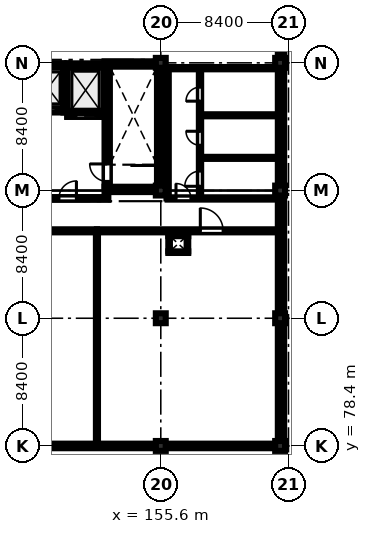
"""IFC4 building model, lengths in metres.
Left out: names, types, materials, properties, quantities, classifications, styles, units other than length and angle.
Written with IfcOpenShell. Run it as: python <this file> out.ifc"""

import sys

from ifc_helpers import new_model, si_unit, direction, frame, frame_2d, origin, origin_2d, place, context, subcontext, project, spatial, rectangle, extrude, element, fill, save


model = new_model("IFC4")
c1 = context("Model", 3, precision=1e-05, world=origin(), true_north=direction((0.0, 1.0)))
c2 = subcontext(c1, "Body", "Model", "MODEL_VIEW")
j1 = project(units=[si_unit("LENGTHUNIT", "METRE"), si_unit("PLANEANGLEUNIT", "RADIAN")], contexts=[c1])
p1 = place(None, origin())
s1 = spatial("IfcSite", under=j1, at=p1, CompositionType="ELEMENT")
p2 = place(p1, origin())
s2 = spatial("IfcBuilding", under=s1, at=p2, CompositionType="ELEMENT")
p3 = place(p2, frame((0.0, 0.0, 65.7)))
s3 = spatial("IfcBuildingStorey", under=s2, at=p3, CompositionType="ELEMENT", Elevation=65.7)
for number, where, z_axis, x_axis in (
    (1, (155.6, 78.4, 0.0), (0.0, 0.0, 1.0), (1.0, 0.0, 0.0)),
    (2, (155.6, 86.8, 0.0), (0.0, 0.0, 1.0), (1.0, 0.0, 0.0)),
    (3, (155.6, 95.2, 0.0), (0.0, 0.0, 1.0), (1.0, 0.0, 0.0)),
    (4, (155.6, 103.6, 0.0), (0.0, 0.0, 1.0), (1.0, 0.0, 0.0)),
    (5, (163.45, 78.4, 0.0), (0.0, 0.0, 1.0), (1.0, 0.0, 0.0)),
    (6, (163.45, 86.8, 0.0), (0.0, 0.0, 1.0), (1.0, 0.0, 0.0)),
    (7, (163.45, 95.2, 0.0), (0.0, 0.0, 1.0), (1.0, 0.0, 0.0)),
    (8, (163.45, 103.6, 0.0), (0.0, 0.0, 1.0), (1.0, 0.0, 0.0)),
):
    element("IfcColumn", number, at=place(p3, frame(where, z_axis=z_axis, x_axis=x_axis)), inside=s3, PredefinedType="COLUMN", context=c2, shape_type="SweptSolid", body=[
        extrude(rectangle(XDim=0.65, YDim=0.65, at=origin_2d()), origin(), (0.0, 0.0, 1.0), 4.3),
    ])
for number, where, z_axis, x_axis in (
    (9, (151.9, 95.275, 0.0), (0.0, 0.0, 1.0), (1.0, 0.0, 0.0)),
    (10, (151.9, 103.525, 0.0), (0.0, 0.0, 1.0), (1.0, 0.0, 0.0)),
):
    element("IfcWall", number, at=place(p3, frame(where, z_axis=z_axis, x_axis=x_axis)), inside=s3, PredefinedType="SHEAR", context=c2, shape_type="SweptSolid", body=[
        extrude(rectangle(XDim=3.8, YDim=0.35, at=frame_2d((1.9, 0.0))), origin(), (0.0, 0.0, 1.0), 4.3),
    ])
p4 = place(p3, frame((152.075, 95.45, 0.0), z_axis=(0.0, 0.0, 1.0), x_axis=(0.0, 1.0, 0.0)))
e11 = element("IfcWall", 11, at=p4, inside=s3, PredefinedType="SHEAR", context=c2, shape_type="SweptSolid", body=[
    extrude(rectangle(XDim=7.9, YDim=0.35, at=frame_2d((3.95, 0.0))), origin(), (0.0, 0.0, 1.0), 4.3),
])
p5 = place(p4, frame((0.35, 0.0, 0.0)))
e12 = element("IfcOpeningElement", 12, at=p5, cuts=e11, PredefinedType="OPENING", context=c2, shape_type="SweptSolid", body=[
    extrude(rectangle(XDim=1.15, YDim=2.15, at=frame_2d((0.575, 1.075))), frame((0.0, 0.185, 0.0), z_axis=(0.0, -1.0, 0.0), x_axis=(1.0, 0.0, 0.0)), (0.0, 0.0, 1.0), 0.37),
])
p6 = place(p3, frame((155.525, 95.45, 0.0), z_axis=(0.0, 0.0, 1.0), x_axis=(0.0, 1.0, 0.0)))
e13 = element("IfcWall", 13, at=p6, inside=s3, PredefinedType="SHEAR", context=c2, shape_type="SweptSolid", body=[
    extrude(rectangle(XDim=7.9, YDim=0.35, at=frame_2d((3.95, 0.0))), origin(), (0.0, 0.0, 1.0), 4.3),
])
p7 = place(p3, frame((147.15, 100.475, 0.0), z_axis=(0.0, 0.0, 1.0), x_axis=(1.0, 0.0, 0.0)))
e14 = element("IfcWall", 14, at=p7, inside=s3, PredefinedType="SHEAR", context=c2, shape_type="SweptSolid", body=[
    extrude(rectangle(XDim=2.05, YDim=0.25, at=frame_2d((1.025, 0.0))), origin(), (0.0, 0.0, 1.0), 4.3),
])
p8 = place(p7, frame((0.495, 0.0, 0.0)))
e15 = element("IfcOpeningElement", 15, at=p8, cuts=e14, PredefinedType="OPENING", context=c2, shape_type="SweptSolid", body=[
    extrude(rectangle(XDim=1.06, YDim=2.15, at=frame_2d((0.53, 1.075))), frame((0.0, 0.135, 0.0), z_axis=(0.0, -1.0, 0.0), x_axis=(1.0, 0.0, 0.0)), (0.0, 0.0, 1.0), 0.27),
])
p9 = place(p3, frame((147.15, 103.425, 0.0), z_axis=(0.0, 0.0, 1.0), x_axis=(1.0, 0.0, 0.0)))
e16 = element("IfcWall", 16, at=p9, inside=s3, PredefinedType="SHEAR", context=c2, shape_type="SweptSolid", body=[
    extrude(rectangle(XDim=2.05, YDim=0.25, at=frame_2d((1.025, 0.0))), origin(), (0.0, 0.0, 1.0), 4.3),
])
p10 = place(p3, frame((149.325, 100.35, 0.0), z_axis=(0.0, 0.0, 1.0), x_axis=(0.0, 1.0, 0.0)))
e17 = element("IfcWall", 17, at=p10, inside=s3, PredefinedType="SHEAR", context=c2, shape_type="SweptSolid", body=[
    extrude(rectangle(XDim=3.2, YDim=0.25, at=frame_2d((1.6, 0.0))), origin(), (0.0, 0.0, 1.0), 4.3),
])
for number, where, z_axis, x_axis in (
    (18, (147.15, 100.475, 4.5), (0.0, 0.0, 1.0), (1.0, 0.0, 0.0)),
    (19, (147.15, 103.425, 4.5), (0.0, 0.0, 1.0), (1.0, 0.0, 0.0)),
):
    element("IfcWall", number, at=place(p3, frame(where, z_axis=z_axis, x_axis=x_axis)), inside=s3, PredefinedType="SHEAR", context=c2, shape_type="SweptSolid", body=[
        extrude(rectangle(XDim=2.05, YDim=0.25, at=frame_2d((1.025, 0.0))), origin(), (0.0, 0.0, 1.0), 1.55),
    ])
p11 = place(p3, frame((149.325, 100.35, 4.5), z_axis=(0.0, 0.0, 1.0), x_axis=(0.0, 1.0, 0.0)))
e20 = element("IfcWall", 20, at=p11, inside=s3, PredefinedType="SHEAR", context=c2, shape_type="SweptSolid", body=[
    extrude(rectangle(XDim=3.2, YDim=0.25, at=frame_2d((1.6, 0.0))), origin(), (0.0, 0.0, 1.0), 1.55),
])
p12 = place(p3, frame((149.45, 100.175, 0.0), z_axis=(0.0, 0.0, 1.0), x_axis=(1.0, 0.0, 0.0)))
e21 = element("IfcWall", 21, at=p12, inside=s3, PredefinedType="SHEAR", context=c2, shape_type="SweptSolid", body=[
    extrude(rectangle(XDim=2.45, YDim=0.25, at=frame_2d((1.225, 0.0))), origin(), (0.0, 0.0, 1.0), 4.3),
])
p13 = place(p12, frame((0.575, 0.0, 0.0)))
e22 = element("IfcOpeningElement", 22, at=p13, cuts=e21, PredefinedType="OPENING", context=c2, shape_type="SweptSolid", body=[
    extrude(rectangle(XDim=1.3, YDim=2.25, at=frame_2d((0.65, 1.125))), frame((0.0, 0.135, 0.0), z_axis=(0.0, -1.0, 0.0), x_axis=(1.0, 0.0, 0.0)), (0.0, 0.0, 1.0), 0.27),
])
p14 = place(p3, frame((149.45, 103.425, 0.0), z_axis=(0.0, 0.0, 1.0), x_axis=(1.0, 0.0, 0.0)))
e23 = element("IfcWall", 23, at=p14, inside=s3, PredefinedType="SHEAR", context=c2, shape_type="SweptSolid", body=[
    extrude(rectangle(XDim=2.45, YDim=0.25, at=frame_2d((1.225, 0.0))), origin(), (0.0, 0.0, 1.0), 4.3),
])
for number, where, z_axis, x_axis in (
    (24, (149.45, 100.175, 4.5), (0.0, 0.0, 1.0), (1.0, 0.0, 0.0)),
    (25, (149.45, 103.425, 4.5), (0.0, 0.0, 1.0), (1.0, 0.0, 0.0)),
):
    element("IfcWall", number, at=place(p3, frame(where, z_axis=z_axis, x_axis=x_axis)), inside=s3, PredefinedType="SHEAR", context=c2, shape_type="SweptSolid", body=[
        extrude(rectangle(XDim=2.4, YDim=0.25, at=frame_2d((1.2, 0.0))), origin(), (0.0, 0.0, 1.0), 1.55),
    ])
p15 = place(p3, frame((151.975, 100.05, 4.5), z_axis=(0.0, 0.0, 1.0), x_axis=(0.0, 1.0, 0.0)))
e26 = element("IfcWall", 26, at=p15, inside=s3, PredefinedType="SHEAR", context=c2, shape_type="SweptSolid", body=[
    extrude(rectangle(XDim=3.5, YDim=0.25, at=frame_2d((1.75, 0.0))), origin(), (0.0, 0.0, 1.0), 1.55),
])
p16 = place(p3, frame((155.275, 78.4, 0.0), z_axis=(0.0, 0.0, 1.0), x_axis=(-1.0, 0.0, 0.0)))
e27 = element("IfcWall", 27, at=p16, inside=s3, PredefinedType="STANDARD", context=c2, shape_type="SweptSolid", body=[
    extrude(rectangle(XDim=7.75, YDim=0.3, at=frame_2d((3.875, 0.0))), origin(), (0.0, 0.0, 1.0), 3.7),
])
p17 = place(p16, frame((1.15, 0.0, 0.95)))
e28 = element("IfcOpeningElement", 28, at=p17, cuts=e27, PredefinedType="OPENING", context=c2, shape_type="SweptSolid", body=[
    extrude(rectangle(XDim=2.5, YDim=1.9, at=frame_2d((1.25, 0.95))), frame((0.0, 0.16, 0.0), z_axis=(0.0, -1.0, 0.0), x_axis=(1.0, 0.0, 0.0)), (0.0, 0.0, 1.0), 0.32),
])
p18 = place(p3, frame((163.125, 78.4, 0.0), z_axis=(0.0, 0.0, 1.0), x_axis=(-1.0, 0.0, 0.0)))
e29 = element("IfcWall", 29, at=p18, inside=s3, PredefinedType="STANDARD", context=c2, shape_type="SweptSolid", body=[
    extrude(rectangle(XDim=7.2, YDim=0.3, at=frame_2d((3.6, 0.0))), origin(), (0.0, 0.0, 1.0), 3.7),
])
p19 = place(p18, frame((1.15, 0.0, 0.95)))
e30 = element("IfcOpeningElement", 30, at=p19, cuts=e29, PredefinedType="OPENING", context=c2, shape_type="SweptSolid", body=[
    extrude(rectangle(XDim=2.5, YDim=1.9, at=frame_2d((1.25, 0.95))), frame((0.0, 0.16, 0.0), z_axis=(0.0, -1.0, 0.0), x_axis=(1.0, 0.0, 0.0)), (0.0, 0.0, 1.0), 0.32),
])
p20 = place(p3, frame((163.45, 86.475, 0.0), z_axis=(0.0, 0.0, 1.0), x_axis=(0.0, -1.0, 0.0)))
e31 = element("IfcWall", 31, at=p20, inside=s3, PredefinedType="STANDARD", context=c2, shape_type="SweptSolid", body=[
    extrude(rectangle(XDim=7.75, YDim=0.3, at=frame_2d((3.875, 0.0))), origin(), (0.0, 0.0, 1.0), 3.7),
])
p21 = place(p20, frame((1.15, 0.0, 1.1)))
e32 = element("IfcOpeningElement", 32, at=p21, cuts=e31, PredefinedType="OPENING", context=c2, shape_type="SweptSolid", body=[
    extrude(rectangle(XDim=1.8, YDim=1.8, at=frame_2d((0.9, 0.9))), frame((0.0, 0.16, 0.0), z_axis=(0.0, -1.0, 0.0), x_axis=(1.0, 0.0, 0.0)), (0.0, 0.0, 1.0), 0.32),
])
p22 = place(p3, frame((163.45, 94.875, 0.0), z_axis=(0.0, 0.0, 1.0), x_axis=(0.0, -1.0, 0.0)))
e33 = element("IfcWall", 33, at=p22, inside=s3, PredefinedType="STANDARD", context=c2, shape_type="SweptSolid", body=[
    extrude(rectangle(XDim=7.75, YDim=0.3, at=frame_2d((3.875, 0.0))), origin(), (0.0, 0.0, 1.0), 3.7),
])
p23 = place(p22, frame((4.2, 0.0, 1.1)))
e34 = element("IfcOpeningElement", 34, at=p23, cuts=e33, PredefinedType="OPENING", context=c2, shape_type="SweptSolid", body=[
    extrude(rectangle(XDim=1.8, YDim=1.8, at=frame_2d((0.9, 0.9))), frame((0.0, 0.16, 0.0), z_axis=(0.0, -1.0, 0.0), x_axis=(1.0, 0.0, 0.0)), (0.0, 0.0, 1.0), 0.32),
])
p24 = place(p3, frame((163.45, 103.275, 0.0), z_axis=(0.0, 0.0, 1.0), x_axis=(0.0, -1.0, 0.0)))
e35 = element("IfcWall", 35, at=p24, inside=s3, PredefinedType="STANDARD", context=c2, shape_type="SweptSolid", body=[
    extrude(rectangle(XDim=7.75, YDim=0.3, at=frame_2d((3.875, 0.0))), origin(), (0.0, 0.0, 1.0), 3.7),
])
p25 = place(p24, frame((1.15, 0.0, 1.1)))
e36 = element("IfcOpeningElement", 36, at=p25, cuts=e35, PredefinedType="OPENING", context=c2, shape_type="SweptSolid", body=[
    extrude(rectangle(XDim=1.4, YDim=1.4, at=frame_2d((0.7, 0.7))), frame((0.0, 0.16, 0.0), z_axis=(0.0, -1.0, 0.0), x_axis=(1.0, 0.0, 0.0)), (0.0, 0.0, 1.0), 0.32),
])
p26 = place(p3, frame((163.45, 111.125, 0.0), z_axis=(0.0, 0.0, 1.0), x_axis=(0.0, -1.0, 0.0)))
e37 = element("IfcWall", 37, at=p26, inside=s3, PredefinedType="STANDARD", context=c2, shape_type="SweptSolid", body=[
    extrude(rectangle(XDim=7.2, YDim=0.3, at=frame_2d((3.6, 0.0))), origin(), (0.0, 0.0, 1.0), 3.7),
])
p27 = place(p26, frame((1.15, 0.0, 1.1)))
e38 = element("IfcOpeningElement", 38, at=p27, cuts=e37, PredefinedType="OPENING", context=c2, shape_type="SweptSolid", body=[
    extrude(rectangle(XDim=1.8, YDim=1.8, at=frame_2d((0.9, 0.9))), frame((0.0, 0.16, 0.0), z_axis=(0.0, -1.0, 0.0), x_axis=(1.0, 0.0, 0.0)), (0.0, 0.0, 1.0), 0.32),
])
p28 = place(p3, frame((138.685, 78.4, 4.5), z_axis=(0.0, 0.0, 1.0), x_axis=(1.0, 0.0, 0.0)))
e39 = element("IfcWall", 39, at=p28, inside=s3, PredefinedType="PARAPET", context=c2, shape_type="SweptSolid", body=[
    extrude(rectangle(XDim=25.03, YDim=0.23, at=frame_2d((12.515, 0.0))), origin(), (0.0, 0.0, 1.0), 1.35),
])
p29 = place(p3, frame((163.6, 78.515, 4.5), z_axis=(0.0, 0.0, 1.0), x_axis=(0.0, 1.0, 0.0)))
e40 = element("IfcWall", 40, at=p29, inside=s3, PredefinedType="PARAPET", context=c2, shape_type="SweptSolid", body=[
    extrude(rectangle(XDim=32.97, YDim=0.23, at=frame_2d((16.485, 0.0))), origin(), (0.0, 0.0, 1.0), 1.35),
])
p30 = place(p3, frame((147.3, 94.68, 0.0), z_axis=(0.0, 0.0, 1.0), x_axis=(1.0, 0.0, 0.0)))
e41 = element("IfcWall", 41, at=p30, inside=s3, PredefinedType="STANDARD", context=c2, shape_type="SweptSolid", body=[
    extrude(rectangle(XDim=4.85, YDim=0.18, at=frame_2d((2.425, 0.0))), origin(), (0.0, 0.0, 1.0), 4.3),
])
p31 = place(p30, frame((1.6, 0.0, 0.0)))
e42 = element("IfcOpeningElement", 42, at=p31, cuts=e41, PredefinedType="OPENING", context=c2, shape_type="SweptSolid", body=[
    extrude(rectangle(XDim=1.15, YDim=2.15, at=frame_2d((0.575, 1.075))), frame((0.0, 0.1, 0.0), z_axis=(0.0, -1.0, 0.0), x_axis=(1.0, 0.0, 0.0)), (0.0, 0.0, 1.0), 0.2),
])
p32 = place(p3, frame((156.05, 94.68, 0.0), z_axis=(0.0, 0.0, 1.0), x_axis=(1.0, 0.0, 0.0)))
e43 = element("IfcWall", 43, at=p32, inside=s3, PredefinedType="PARTITIONING", context=c2, shape_type="SweptSolid", body=[
    extrude(rectangle(XDim=7.15, YDim=0.15, at=frame_2d((3.575, 0.0))), origin(), (0.0, 0.0, 1.0), 4.3),
])
p33 = place(p32, frame((0.55, 0.0, 0.0)))
e44 = element("IfcOpeningElement", 44, at=p33, cuts=e43, PredefinedType="OPENING", context=c2, shape_type="SweptSolid", body=[
    extrude(rectangle(XDim=0.98, YDim=2.12, at=frame_2d((0.49, 1.06))), frame((0.0, 0.085, 0.0), z_axis=(0.0, -1.0, 0.0), x_axis=(1.0, 0.0, 0.0)), (0.0, 0.0, 1.0), 0.17),
])
p34 = place(p3, frame((158.18, 94.68, 0.0), z_axis=(0.0, 0.0, 1.0), x_axis=(0.0, 1.0, 0.0)))
e45 = element("IfcWall", 45, at=p34, inside=s3, PredefinedType="PARTITIONING", context=c2, shape_type="SweptSolid", body=[
    extrude(rectangle(XDim=8.57, YDim=0.15, at=frame_2d((4.285, 0.0))), origin(), (0.0, 0.0, 1.0), 4.3),
])
p35 = place(p34, frame((0.8, 0.0, 0.0)))
e46 = element("IfcOpeningElement", 46, at=p35, cuts=e45, PredefinedType="OPENING", context=c2, shape_type="SweptSolid", body=[
    extrude(rectangle(XDim=1.0, YDim=2.12, at=frame_2d((0.5, 1.06))), frame((0.0, 0.085, 0.0), z_axis=(0.0, -1.0, 0.0), x_axis=(1.0, 0.0, 0.0)), (0.0, 0.0, 1.0), 0.17),
])
p36 = place(p34, frame((3.5, 0.0, 0.0)))
e47 = element("IfcOpeningElement", 47, at=p36, cuts=e45, PredefinedType="OPENING", context=c2, shape_type="SweptSolid", body=[
    extrude(rectangle(XDim=0.92, YDim=2.1, at=frame_2d((0.46, 1.05))), frame((0.0, 0.085, 0.0), z_axis=(0.0, -1.0, 0.0), x_axis=(1.0, 0.0, 0.0)), (0.0, 0.0, 1.0), 0.17),
])
p37 = place(p34, frame((6.4, 0.0, 0.0)))
e48 = element("IfcOpeningElement", 48, at=p37, cuts=e45, PredefinedType="OPENING", context=c2, shape_type="SweptSolid", body=[
    extrude(rectangle(XDim=0.92, YDim=2.1, at=frame_2d((0.46, 1.05))), frame((0.0, 0.085, 0.0), z_axis=(0.0, -1.0, 0.0), x_axis=(1.0, 0.0, 0.0)), (0.0, 0.0, 1.0), 0.17),
])
for number, where, z_axis, x_axis in (
    (49, (158.18, 97.35, 0.0), (0.0, 0.0, 1.0), (1.0, 0.0, 0.0)),
    (50, (158.18, 100.15, 0.0), (0.0, 0.0, 1.0), (1.0, 0.0, 0.0)),
):
    element("IfcWall", number, at=place(p3, frame(where, z_axis=z_axis, x_axis=x_axis)), inside=s3, PredefinedType="PARTITIONING", context=c2, shape_type="SweptSolid", body=[
        extrude(rectangle(XDim=5.02, YDim=0.135, at=frame_2d((2.51, 0.0))), origin(), (0.0, 0.0, 1.0), 4.3),
    ])
p38 = place(p3, frame((156.05, 103.25, 0.0), z_axis=(0.0, 0.0, 1.0), x_axis=(1.0, 0.0, 0.0)))
e51 = element("IfcWall", 51, at=p38, inside=s3, PredefinedType="PARTITIONING", context=c2, shape_type="SweptSolid", body=[
    extrude(rectangle(XDim=7.15, YDim=0.15, at=frame_2d((3.575, 0.0))), origin(), (0.0, 0.0, 1.0), 4.3),
])
p39 = place(p3, frame((156.05, 94.68, 0.0), z_axis=(0.0, 0.0, 1.0), x_axis=(0.0, 1.0, 0.0)))
e52 = element("IfcWall", 52, at=p39, inside=s3, PredefinedType="PARTITIONING", context=c2, shape_type="SweptSolid", body=[
    extrude(rectangle(XDim=8.57, YDim=0.15, at=frame_2d((4.285, 0.0))), origin(), (0.0, 0.0, 1.0), 4.3),
])
p40 = place(p3, frame((138.95, 92.55, 0.0), z_axis=(0.0, 0.0, 1.0), x_axis=(1.0, 0.0, 0.0)))
e53 = element("IfcWall", 53, at=p40, inside=s3, PredefinedType="SOLIDWALL", context=c2, shape_type="SweptSolid", body=[
    extrude(rectangle(XDim=12.45, YDim=0.2, at=frame_2d((6.225, 0.0))), origin(), (0.0, 0.0, 1.0), 4.3),
])
p41 = place(p40, frame((3.65, 0.0, 0.0)))
e54 = element("IfcOpeningElement", 54, at=p41, cuts=e53, PredefinedType="OPENING", context=c2, shape_type="SweptSolid", body=[
    extrude(rectangle(XDim=1.25, YDim=2.2, at=frame_2d((0.625, 1.1))), frame((0.0, 0.11, 0.0), z_axis=(0.0, -1.0, 0.0), x_axis=(1.0, 0.0, 0.0)), (0.0, 0.0, 1.0), 0.22),
])
p42 = place(p3, frame((151.4, 92.55, 0.0), z_axis=(0.0, 0.0, 1.0), x_axis=(1.0, 0.0, 0.0)))
e55 = element("IfcWall", 55, at=p42, inside=s3, PredefinedType="SOLIDWALL", context=c2, shape_type="SweptSolid", body=[
    extrude(rectangle(XDim=11.95, YDim=0.2, at=frame_2d((5.975, 0.0))), origin(), (0.0, 0.0, 1.0), 4.3),
])
p43 = place(p42, frame((6.8, 0.0, 0.0)))
e56 = element("IfcOpeningElement", 56, at=p43, cuts=e55, PredefinedType="OPENING", context=c2, shape_type="SweptSolid", body=[
    extrude(rectangle(XDim=1.5, YDim=2.2, at=frame_2d((0.75, 1.1))), frame((0.0, 0.11, 0.0), z_axis=(0.0, -1.0, 0.0), x_axis=(1.0, 0.0, 0.0)), (0.0, 0.0, 1.0), 0.22),
])
p44 = place(p3, frame((151.4, 78.55, 0.0), z_axis=(0.0, 0.0, 1.0), x_axis=(0.0, 1.0, 0.0)))
e57 = element("IfcWall", 57, at=p44, inside=s3, PredefinedType="PARTITIONING", context=c2, shape_type="SweptSolid", body=[
    extrude(rectangle(XDim=14.0, YDim=0.135, at=frame_2d((7.0, 0.0))), origin(), (0.0, 0.0, 1.0), 3.85),
])
for number, where, z_axis, x_axis in (
    (58, (156.095, 91.147, 0.0), (0.0, 0.0, 1.0), (1.0, 0.0, 0.0)),
    (59, (156.095, 92.252, 0.0), (0.0, 0.0, 1.0), (1.0, 0.0, 0.0)),
):
    element("IfcWall", number, at=place(p3, frame(where, z_axis=z_axis, x_axis=x_axis)), inside=s3, PredefinedType="PARTITIONING", context=c2, shape_type="SweptSolid", body=[
        extrude(rectangle(XDim=1.31, YDim=0.105, at=frame_2d((0.655, 0.0))), origin(), (0.0, 0.0, 1.0), 4.3),
    ])
for number, where, z_axis, x_axis in (
    (60, (156.147, 91.2, 0.0), (0.0, 0.0, 1.0), (0.0, 1.0, 0.0)),
    (61, (157.353, 91.2, 0.0), (0.0, 0.0, 1.0), (0.0, 1.0, 0.0)),
):
    element("IfcWall", number, at=place(p3, frame(where, z_axis=z_axis, x_axis=x_axis)), inside=s3, PredefinedType="PARTITIONING", context=c2, shape_type="SweptSolid", body=[
        extrude(rectangle(XDim=1.0, YDim=0.105, at=frame_2d((0.5, 0.0))), origin(), (0.0, 0.0, 1.0), 4.3),
    ])
p45 = place(p17, origin())
e62 = element("IfcWindow", 62, at=p45, inside=s3, PartitioningType="TRIPLE_PANEL_VERTICAL", PredefinedType="WINDOW", context=c2, shape_type="SweptSolid", body=[
    extrude(rectangle(XDim=2.5, YDim=1.9, at=frame_2d((1.25, 0.95))), frame((0.0, 0.03, 0.0), z_axis=(0.0, -1.0, 0.0), x_axis=(1.0, 0.0, 0.0)), (0.0, 0.0, 1.0), 0.06),
])
fill(e28, e62)
p46 = place(p19, origin())
e63 = element("IfcWindow", 63, at=p46, inside=s3, PartitioningType="TRIPLE_PANEL_VERTICAL", PredefinedType="WINDOW", context=c2, shape_type="SweptSolid", body=[
    extrude(rectangle(XDim=2.5, YDim=1.9, at=frame_2d((1.25, 0.95))), frame((0.0, 0.03, 0.0), z_axis=(0.0, -1.0, 0.0), x_axis=(1.0, 0.0, 0.0)), (0.0, 0.0, 1.0), 0.06),
])
fill(e30, e63)
p47 = place(p21, origin())
e64 = element("IfcWindow", 64, at=p47, inside=s3, PartitioningType="DOUBLE_PANEL_VERTICAL", PredefinedType="WINDOW", context=c2, shape_type="SweptSolid", body=[
    extrude(rectangle(XDim=1.8, YDim=1.8, at=frame_2d((0.9, 0.9))), frame((0.0, 0.03, 0.0), z_axis=(0.0, -1.0, 0.0), x_axis=(1.0, 0.0, 0.0)), (0.0, 0.0, 1.0), 0.06),
])
fill(e32, e64)
p48 = place(p23, origin())
e65 = element("IfcWindow", 65, at=p48, inside=s3, PartitioningType="DOUBLE_PANEL_VERTICAL", PredefinedType="WINDOW", context=c2, shape_type="SweptSolid", body=[
    extrude(rectangle(XDim=1.8, YDim=1.8, at=frame_2d((0.9, 0.9))), frame((0.0, 0.03, 0.0), z_axis=(0.0, -1.0, 0.0), x_axis=(1.0, 0.0, 0.0)), (0.0, 0.0, 1.0), 0.06),
])
fill(e34, e65)
p49 = place(p25, origin())
e66 = element("IfcWindow", 66, at=p49, inside=s3, PartitioningType="SINGLE_PANEL", PredefinedType="WINDOW", context=c2, shape_type="SweptSolid", body=[
    extrude(rectangle(XDim=1.4, YDim=1.4, at=frame_2d((0.7, 0.7))), frame((0.0, 0.03, 0.0), z_axis=(0.0, -1.0, 0.0), x_axis=(1.0, 0.0, 0.0)), (0.0, 0.0, 1.0), 0.06),
])
fill(e36, e66)
p50 = place(p31, origin())
e67 = element("IfcDoor", 67, at=p50, inside=s3, OperationType="SINGLE_SWING_RIGHT", PredefinedType="DOOR", context=c2, shape_type="SweptSolid", body=[
    extrude(rectangle(XDim=1.15, YDim=2.15, at=frame_2d((0.575, 1.075))), frame((0.0, 0.025, 0.0), z_axis=(0.0, -1.0, 0.0), x_axis=(1.0, 0.0, 0.0)), (0.0, 0.0, 1.0), 0.05),
])
fill(e42, e67)
p51 = place(p33, origin())
e68 = element("IfcDoor", 68, at=p51, inside=s3, OperationType="SINGLE_SWING_LEFT", PredefinedType="DOOR", context=c2, shape_type="SweptSolid", body=[
    extrude(rectangle(XDim=0.98, YDim=2.12, at=frame_2d((0.49, 1.06))), frame((0.0, 0.025, 0.0), z_axis=(0.0, -1.0, 0.0), x_axis=(1.0, 0.0, 0.0)), (0.0, 0.0, 1.0), 0.05),
])
fill(e44, e68)
p52 = place(p35, origin())
e69 = element("IfcDoor", 69, at=p52, inside=s3, OperationType="SINGLE_SWING_LEFT", PredefinedType="DOOR", context=c2, shape_type="SweptSolid", body=[
    extrude(rectangle(XDim=1.0, YDim=2.12, at=frame_2d((0.5, 1.06))), frame((0.0, 0.025, 0.0), z_axis=(0.0, -1.0, 0.0), x_axis=(1.0, 0.0, 0.0)), (0.0, 0.0, 1.0), 0.05),
])
fill(e46, e69)
p53 = place(p36, origin())
e70 = element("IfcDoor", 70, at=p53, inside=s3, OperationType="SINGLE_SWING_RIGHT", PredefinedType="DOOR", context=c2, shape_type="SweptSolid", body=[
    extrude(rectangle(XDim=0.92, YDim=2.1, at=frame_2d((0.46, 1.05))), frame((0.0, 0.025, 0.0), z_axis=(0.0, -1.0, 0.0), x_axis=(1.0, 0.0, 0.0)), (0.0, 0.0, 1.0), 0.05),
])
fill(e47, e70)
p54 = place(p37, origin())
e71 = element("IfcDoor", 71, at=p54, inside=s3, OperationType="SINGLE_SWING_LEFT", PredefinedType="DOOR", context=c2, shape_type="SweptSolid", body=[
    extrude(rectangle(XDim=0.92, YDim=2.1, at=frame_2d((0.46, 1.05))), frame((0.0, 0.025, 0.0), z_axis=(0.0, -1.0, 0.0), x_axis=(1.0, 0.0, 0.0)), (0.0, 0.0, 1.0), 0.05),
])
fill(e48, e71)
p55 = place(p43, origin())
e72 = element("IfcDoor", 72, at=p55, inside=s3, OperationType="SINGLE_SWING_LEFT", PredefinedType="DOOR", context=c2, shape_type="SweptSolid", body=[
    extrude(rectangle(XDim=1.5, YDim=2.2, at=frame_2d((0.75, 1.1))), frame((0.0, 0.025, 0.0), z_axis=(0.0, -1.0, 0.0), x_axis=(1.0, 0.0, 0.0)), (0.0, 0.0, 1.0), 0.05),
])
fill(e56, e72)
p56 = place(p5, origin())
e73 = element("IfcDoor", 73, at=p56, inside=s3, OperationType="SINGLE_SWING_RIGHT", PredefinedType="DOOR", context=c2, shape_type="SweptSolid", body=[
    extrude(rectangle(XDim=1.15, YDim=2.15, at=frame_2d((0.575, 1.075))), frame((0.0, 0.025, 0.0), z_axis=(0.0, -1.0, 0.0), x_axis=(1.0, 0.0, 0.0)), (0.0, 0.0, 1.0), 0.05),
])
fill(e12, e73)
p57 = place(p8, origin())
e74 = element("IfcDoor", 74, at=p57, inside=s3, OperationType="SLIDING_TO_LEFT", PredefinedType="DOOR", context=c2, shape_type="SweptSolid", body=[
    extrude(rectangle(XDim=1.06, YDim=2.15, at=frame_2d((0.53, 1.075))), frame((0.0, 0.025, 0.0), z_axis=(0.0, -1.0, 0.0), x_axis=(1.0, 0.0, 0.0)), (0.0, 0.0, 1.0), 0.05),
])
fill(e15, e74)
p58 = place(p13, origin())
e75 = element("IfcDoor", 75, at=p58, inside=s3, OperationType="SLIDING_TO_LEFT", PredefinedType="DOOR", context=c2, shape_type="SweptSolid", body=[
    extrude(rectangle(XDim=1.3, YDim=2.25, at=frame_2d((0.65, 1.125))), frame((0.0, 0.025, 0.0), z_axis=(0.0, -1.0, 0.0), x_axis=(1.0, 0.0, 0.0)), (0.0, 0.0, 1.0), 0.05),
])
fill(e22, e75)
save(model, sys.argv[1])
